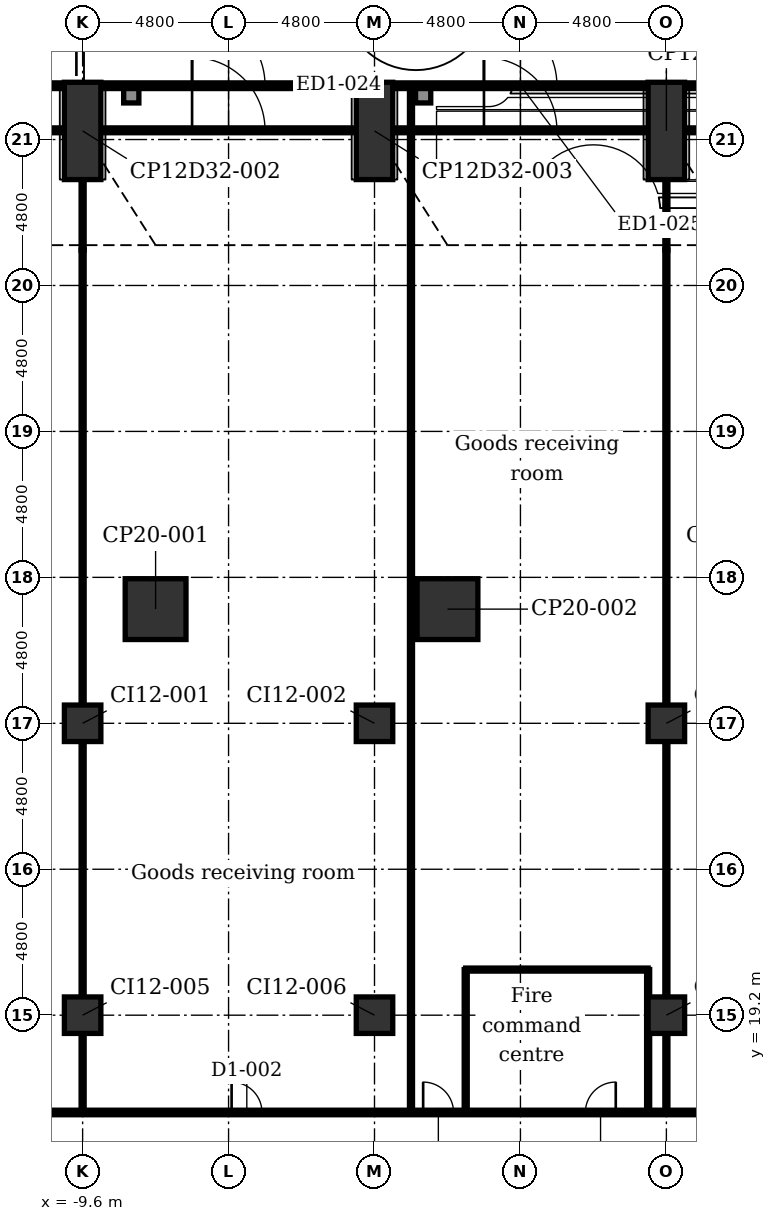
"""IFC4 building model, lengths in metres.
Left out: names, types, materials, properties, quantities, classifications, styles, units other than length and angle.
Written with IfcOpenShell. Run it as: python <this file> out.ifc"""

import sys

from ifc_helpers import new_model, si_unit, direction, frame, frame_2d, origin, origin_2d, place, context, subcontext, project, spatial, rectangle, extrude, element, fill, save


model = new_model("IFC4")
c1 = context("Model", 3, precision=1e-05, world=origin(), true_north=direction((0.0, 1.0)))
c2 = subcontext(c1, "Body", "Model", "MODEL_VIEW")
j1 = project(units=[si_unit("LENGTHUNIT", "METRE"), si_unit("PLANEANGLEUNIT", "RADIAN")], contexts=[c1])
p1 = place(None, origin())
s1 = spatial("IfcSite", under=j1, at=p1, CompositionType="ELEMENT")
p2 = place(p1, origin())
s2 = spatial("IfcBuilding", under=s1, at=p2, CompositionType="ELEMENT")
p3 = place(p2, origin())
s3 = spatial("IfcBuildingStorey", under=s2, at=p3, CompositionType="ELEMENT", Elevation=0.0)
for number, where, z_axis, x_axis in (
    (1, (-9.6, 48.283, -0.4), (0.0, 0.0, 1.0), (1.0, 0.0, 0.0)),
    (2, (0.0, 48.283, -0.4), (0.0, 0.0, 1.0), (1.0, 0.0, 0.0)),
    (3, (9.6, 48.283, -0.4), (0.0, 0.0, 1.0), (1.0, 0.0, 0.0)),
):
    element("IfcColumn", number, at=place(p3, frame(where, z_axis=z_axis, x_axis=x_axis)), inside=s3, PredefinedType="COLUMN", context=c2, shape_type="SweptSolid", body=[
        extrude(rectangle(XDim=1.2, YDim=3.2, at=origin_2d()), origin(), (0.0, 0.0, 1.0), 7.1),
    ])
for number, where, z_axis, x_axis in (
    (4, (-7.2, 32.555, -0.4), (0.0, 0.0, 1.0), (1.0, 0.0, 0.0)),
    (5, (2.4, 32.555, -0.4), (0.0, 0.0, 1.0), (1.0, 0.0, 0.0)),
):
    element("IfcColumn", number, at=place(p3, frame(where, z_axis=z_axis, x_axis=x_axis)), inside=s3, PredefinedType="COLUMN", context=c2, shape_type="SweptSolid", body=[
        extrude(rectangle(XDim=2.0, YDim=2.0, at=origin_2d()), origin(), (0.0, 0.0, 1.0), 7.1),
    ])
for number, where, z_axis, x_axis in (
    (6, (-9.6, 19.2, -0.4), (0.0, 0.0, 1.0), (1.0, 0.0, 0.0)),
    (7, (-9.6, 28.8, -0.4), (0.0, 0.0, 1.0), (1.0, 0.0, 0.0)),
    (8, (0.0, 19.2, -0.4), (0.0, 0.0, 1.0), (1.0, 0.0, 0.0)),
    (9, (0.0, 28.8, -0.4), (0.0, 0.0, 1.0), (1.0, 0.0, 0.0)),
    (10, (9.6, 19.2, -0.4), (0.0, 0.0, 1.0), (1.0, 0.0, 0.0)),
    (11, (9.6, 28.8, -0.4), (0.0, 0.0, 1.0), (1.0, 0.0, 0.0)),
):
    element("IfcColumn", number, at=place(p3, frame(where, z_axis=z_axis, x_axis=x_axis)), inside=s3, PredefinedType="COLUMN", context=c2, shape_type="SweptSolid", body=[
        extrude(rectangle(XDim=1.2, YDim=1.2, at=origin_2d()), origin(), (0.0, 0.0, 1.0), 7.1),
    ])
p4 = place(p3, frame((-18.598, 48.303, 0.0), z_axis=(0.0, 0.0, 1.0), x_axis=(1.0, 0.0, 0.0)))
e12 = element("IfcWall", 12, at=p4, inside=s3, PredefinedType="PARTITIONING", context=c2, shape_type="SweptSolid", body=[
    extrude(rectangle(XDim=8.396, YDim=0.16, at=frame_2d((4.198, 0.0))), origin(), (0.0, 0.0, 1.0), 6.7),
])
p5 = place(p4, frame((2.998, 0.0, 0.0)))
e13 = element("IfcOpeningElement", 13, at=p5, cuts=e12, PredefinedType="OPENING", context=c2, shape_type="SweptSolid", body=[
    extrude(rectangle(XDim=2.4, YDim=2.4, at=frame_2d((1.2, 1.2))), frame((0.0, 0.09, 0.0), z_axis=(0.0, -1.0, 0.0), x_axis=(1.0, 0.0, 0.0)), (0.0, 0.0, 1.0), 0.18),
])
p6 = place(p3, frame((-8.998, 48.303, 0.0), z_axis=(0.0, 0.0, 1.0), x_axis=(1.0, 0.0, 0.0)))
e14 = element("IfcWall", 14, at=p6, inside=s3, PredefinedType="PARTITIONING", context=c2, shape_type="SweptSolid", body=[
    extrude(rectangle(XDim=8.396, YDim=0.16, at=frame_2d((4.198, 0.0))), origin(), (0.0, 0.0, 1.0), 6.7),
])
p7 = place(p6, frame((2.998, 0.0, 0.0)))
e15 = element("IfcOpeningElement", 15, at=p7, cuts=e14, PredefinedType="OPENING", context=c2, shape_type="SweptSolid", body=[
    extrude(rectangle(XDim=2.4, YDim=2.4, at=frame_2d((1.2, 1.2))), frame((0.0, 0.09, 0.0), z_axis=(0.0, -1.0, 0.0), x_axis=(1.0, 0.0, 0.0)), (0.0, 0.0, 1.0), 0.18),
])
p8 = place(p3, frame((0.602, 48.303, 0.0), z_axis=(0.0, 0.0, 1.0), x_axis=(1.0, 0.0, 0.0)))
e16 = element("IfcWall", 16, at=p8, inside=s3, PredefinedType="PARTITIONING", context=c2, shape_type="SweptSolid", body=[
    extrude(rectangle(XDim=8.396, YDim=0.16, at=frame_2d((4.198, 0.0))), origin(), (0.0, 0.0, 1.0), 6.7),
])
p9 = place(p8, frame((2.998, 0.0, 0.0)))
e17 = element("IfcOpeningElement", 17, at=p9, cuts=e16, PredefinedType="OPENING", context=c2, shape_type="SweptSolid", body=[
    extrude(rectangle(XDim=2.4, YDim=2.4, at=frame_2d((1.2, 1.2))), frame((0.0, 0.09, 0.0), z_axis=(0.0, -1.0, 0.0), x_axis=(1.0, 0.0, 0.0)), (0.0, 0.0, 1.0), 0.18),
])
p10 = place(p3, frame((10.202, 48.303, 0.0), z_axis=(0.0, 0.0, 1.0), x_axis=(1.0, 0.0, 0.0)))
e18 = element("IfcWall", 18, at=p10, inside=s3, PredefinedType="PARTITIONING", context=c2, shape_type="SweptSolid", body=[
    extrude(rectangle(XDim=8.396, YDim=0.16, at=frame_2d((4.198, 0.0))), origin(), (0.0, 0.0, 1.0), 6.7),
])
p11 = place(p10, frame((2.998, 0.0, 0.0)))
e19 = element("IfcOpeningElement", 19, at=p11, cuts=e18, PredefinedType="OPENING", context=c2, shape_type="SweptSolid", body=[
    extrude(rectangle(XDim=2.4, YDim=2.4, at=frame_2d((1.2, 1.2))), frame((0.0, 0.09, 0.0), z_axis=(0.0, -1.0, 0.0), x_axis=(1.0, 0.0, 0.0)), (0.0, 0.0, 1.0), 0.18),
])
p12 = place(p3, frame((-18.596, 49.783, 0.0), z_axis=(0.0, 0.0, 1.0), x_axis=(1.0, 0.0, 0.0)))
e20 = element("IfcWall", 20, at=p12, inside=s3, PredefinedType="PARTITIONING", context=c2, shape_type="SweptSolid", body=[
    extrude(rectangle(XDim=8.392, YDim=0.16, at=frame_2d((4.196, 0.0))), origin(), (0.0, 0.0, 1.0), 6.7),
])
p13 = place(p12, frame((2.996, 0.0, 0.0)))
e21 = element("IfcOpeningElement", 21, at=p13, cuts=e20, PredefinedType="OPENING", context=c2, shape_type="SweptSolid", body=[
    extrude(rectangle(XDim=2.4, YDim=2.4, at=frame_2d((1.2, 1.2))), frame((0.0, 0.09, 0.0), z_axis=(0.0, -1.0, 0.0), x_axis=(1.0, 0.0, 0.0)), (0.0, 0.0, 1.0), 0.18),
])
p14 = place(p3, frame((-8.996, 49.783, 0.0), z_axis=(0.0, 0.0, 1.0), x_axis=(1.0, 0.0, 0.0)))
e22 = element("IfcWall", 22, at=p14, inside=s3, PredefinedType="PARTITIONING", context=c2, shape_type="SweptSolid", body=[
    extrude(rectangle(XDim=8.392, YDim=0.16, at=frame_2d((4.196, 0.0))), origin(), (0.0, 0.0, 1.0), 6.7),
])
p15 = place(p14, frame((2.996, 0.0, 0.0)))
e23 = element("IfcOpeningElement", 23, at=p15, cuts=e22, PredefinedType="OPENING", context=c2, shape_type="SweptSolid", body=[
    extrude(rectangle(XDim=2.4, YDim=2.4, at=frame_2d((1.2, 1.2))), frame((0.0, 0.09, 0.0), z_axis=(0.0, -1.0, 0.0), x_axis=(1.0, 0.0, 0.0)), (0.0, 0.0, 1.0), 0.18),
])
p16 = place(p3, frame((0.604, 49.783, 0.0), z_axis=(0.0, 0.0, 1.0), x_axis=(1.0, 0.0, 0.0)))
e24 = element("IfcWall", 24, at=p16, inside=s3, PredefinedType="PARTITIONING", context=c2, shape_type="SweptSolid", body=[
    extrude(rectangle(XDim=8.392, YDim=0.16, at=frame_2d((4.196, 0.0))), origin(), (0.0, 0.0, 1.0), 6.7),
])
p17 = place(p16, frame((2.996, 0.0, 0.0)))
e25 = element("IfcOpeningElement", 25, at=p17, cuts=e24, PredefinedType="OPENING", context=c2, shape_type="SweptSolid", body=[
    extrude(rectangle(XDim=2.4, YDim=2.4, at=frame_2d((1.2, 1.2))), frame((0.0, 0.09, 0.0), z_axis=(0.0, -1.0, 0.0), x_axis=(1.0, 0.0, 0.0)), (0.0, 0.0, 1.0), 0.18),
])
p18 = place(p3, frame((10.204, 49.783, 0.0), z_axis=(0.0, 0.0, 1.0), x_axis=(1.0, 0.0, 0.0)))
e26 = element("IfcWall", 26, at=p18, inside=s3, PredefinedType="PARTITIONING", context=c2, shape_type="SweptSolid", body=[
    extrude(rectangle(XDim=8.392, YDim=0.16, at=frame_2d((4.196, 0.0))), origin(), (0.0, 0.0, 1.0), 6.7),
])
p19 = place(p18, frame((2.996, 0.0, 0.0)))
e27 = element("IfcOpeningElement", 27, at=p19, cuts=e26, PredefinedType="OPENING", context=c2, shape_type="SweptSolid", body=[
    extrude(rectangle(XDim=2.4, YDim=2.4, at=frame_2d((1.2, 1.2))), frame((0.0, 0.09, 0.0), z_axis=(0.0, -1.0, 0.0), x_axis=(1.0, 0.0, 0.0)), (0.0, 0.0, 1.0), 0.18),
])
for number, where, z_axis, x_axis in (
    (28, (-8.25, 49.453, 0.0), (0.0, 0.0, 1.0), (1.0, 0.0, 0.0)),
    (29, (1.35, 49.453, 0.0), (0.0, 0.0, 1.0), (1.0, 0.0, 0.0)),
):
    element("IfcWall", number, at=place(p3, frame(where, z_axis=z_axis, x_axis=x_axis)), inside=s3, PredefinedType="SOLIDWALL", context=c2, shape_type="SweptSolid", body=[
        extrude(rectangle(XDim=0.5, YDim=0.5, at=frame_2d((0.25, 0.0))), origin(), (0.0, 0.0, 1.0), 6.4),
    ])
p20 = place(p3, frame((9.6, 29.36, 0.0), z_axis=(0.0, 0.0, 1.0), x_axis=(0.0, 1.0, 0.0)))
e30 = element("IfcWall", 30, at=p20, inside=s3, PredefinedType="PARTITIONING", context=c2, shape_type="SweptSolid", body=[
    extrude(rectangle(XDim=15.006, YDim=0.1, at=frame_2d((7.503, 0.0))), origin(), (0.0, 0.0, 1.0), 6.016),
])
p21 = place(p3, frame((9.6, 16.0, 0.0), z_axis=(0.0, 0.0, 1.0), x_axis=(0.0, 1.0, 0.0)))
e31 = element("IfcWall", 31, at=p21, inside=s3, PredefinedType="PARTITIONING", context=c2, shape_type="SweptSolid", body=[
    extrude(rectangle(XDim=2.64, YDim=0.1, at=frame_2d((1.32, 0.0))), origin(), (0.0, 0.0, 1.0), 6.293),
])
p22 = place(p3, frame((9.6, 18.64, 0.0), z_axis=(0.0, 0.0, 1.0), x_axis=(0.0, 1.0, 0.0)))
e32 = element("IfcWall", 32, at=p22, inside=s3, PredefinedType="PARTITIONING", context=c2, shape_type="SweptSolid", body=[
    extrude(rectangle(XDim=1.12, YDim=0.1, at=frame_2d((0.56, 0.0))), origin(), (0.0, 0.0, 1.0), 6.7),
])
p23 = place(p3, frame((9.6, 19.76, 0.0), z_axis=(0.0, 0.0, 1.0), x_axis=(0.0, 1.0, 0.0)))
e33 = element("IfcWall", 33, at=p23, inside=s3, PredefinedType="PARTITIONING", context=c2, shape_type="SweptSolid", body=[
    extrude(rectangle(XDim=8.48, YDim=0.1, at=frame_2d((4.24, 0.0))), origin(), (0.0, 0.0, 1.0), 6.293),
])
p24 = place(p3, frame((9.6, 28.24, 0.0), z_axis=(0.0, 0.0, 1.0), x_axis=(0.0, 1.0, 0.0)))
e34 = element("IfcWall", 34, at=p24, inside=s3, PredefinedType="PARTITIONING", context=c2, shape_type="SweptSolid", body=[
    extrude(rectangle(XDim=1.12, YDim=0.1, at=frame_2d((0.56, 0.0))), origin(), (0.0, 0.0, 1.0), 6.7),
])
p25 = place(p3, frame((9.6, 44.366, 0.0), z_axis=(0.0, 0.0, 1.0), x_axis=(0.0, 1.0, 0.0)))
e35 = element("IfcWall", 35, at=p25, inside=s3, PredefinedType="PARTITIONING", context=c2, shape_type="SweptSolid", body=[
    extrude(rectangle(XDim=5.347, YDim=0.1, at=frame_2d((2.673, 0.0))), origin(), (0.0, 0.0, 1.0), 6.7),
])
for number, where, z_axis, x_axis in (
    (36, (9.0, 16.0, 0.0), (0.0, 0.0, 1.0), (0.0, 1.0, 0.0)),
    (37, (3.0, 16.0, 0.0), (0.0, 0.0, 1.0), (0.0, 1.0, 0.0)),
):
    element("IfcWall", number, at=place(p3, frame(where, z_axis=z_axis, x_axis=x_axis)), inside=s3, PredefinedType="PARTITIONING", context=c2, shape_type="SweptSolid", body=[
        extrude(rectangle(XDim=4.7, YDim=0.1, at=frame_2d((2.35, 0.0))), origin(), (0.0, 0.0, 1.0), 6.7),
    ])
p26 = place(p3, frame((1.2, 16.0, 0.0), z_axis=(0.0, 0.0, 1.0), x_axis=(0.0, 1.0, 0.0)))
e38 = element("IfcWall", 38, at=p26, inside=s3, PredefinedType="PARTITIONING", context=c2, shape_type="SweptSolid", body=[
    extrude(rectangle(XDim=33.713, YDim=0.1, at=frame_2d((16.856, 0.0))), origin(), (0.0, 0.0, 1.0), 6.7),
])
p27 = place(p3, frame((-9.6, 29.36, 0.0), z_axis=(0.0, 0.0, 1.0), x_axis=(0.0, 1.0, 0.0)))
e39 = element("IfcWall", 39, at=p27, inside=s3, PredefinedType="PARTITIONING", context=c2, shape_type="SweptSolid", body=[
    extrude(rectangle(XDim=15.006, YDim=0.1, at=frame_2d((7.503, 0.0))), origin(), (0.0, 0.0, 1.0), 6.016),
])
p28 = place(p3, frame((-9.6, 16.0, 0.0), z_axis=(0.0, 0.0, 1.0), x_axis=(0.0, 1.0, 0.0)))
e40 = element("IfcWall", 40, at=p28, inside=s3, PredefinedType="PARTITIONING", context=c2, shape_type="SweptSolid", body=[
    extrude(rectangle(XDim=2.64, YDim=0.1, at=frame_2d((1.32, 0.0))), origin(), (0.0, 0.0, 1.0), 6.293),
])
p29 = place(p3, frame((-9.6, 18.64, 0.0), z_axis=(0.0, 0.0, 1.0), x_axis=(0.0, 1.0, 0.0)))
e41 = element("IfcWall", 41, at=p29, inside=s3, PredefinedType="PARTITIONING", context=c2, shape_type="SweptSolid", body=[
    extrude(rectangle(XDim=1.12, YDim=0.1, at=frame_2d((0.56, 0.0))), origin(), (0.0, 0.0, 1.0), 6.7),
])
p30 = place(p3, frame((-9.6, 19.76, 0.0), z_axis=(0.0, 0.0, 1.0), x_axis=(0.0, 1.0, 0.0)))
e42 = element("IfcWall", 42, at=p30, inside=s3, PredefinedType="PARTITIONING", context=c2, shape_type="SweptSolid", body=[
    extrude(rectangle(XDim=8.48, YDim=0.1, at=frame_2d((4.24, 0.0))), origin(), (0.0, 0.0, 1.0), 6.293),
])
p31 = place(p3, frame((-9.6, 28.24, 0.0), z_axis=(0.0, 0.0, 1.0), x_axis=(0.0, 1.0, 0.0)))
e43 = element("IfcWall", 43, at=p31, inside=s3, PredefinedType="PARTITIONING", context=c2, shape_type="SweptSolid", body=[
    extrude(rectangle(XDim=1.12, YDim=0.1, at=frame_2d((0.56, 0.0))), origin(), (0.0, 0.0, 1.0), 6.7),
])
p32 = place(p3, frame((-9.6, 44.366, 0.0), z_axis=(0.0, 0.0, 1.0), x_axis=(0.0, 1.0, 0.0)))
e44 = element("IfcWall", 44, at=p32, inside=s3, PredefinedType="PARTITIONING", context=c2, shape_type="SweptSolid", body=[
    extrude(rectangle(XDim=5.347, YDim=0.1, at=frame_2d((2.673, 0.0))), origin(), (0.0, 0.0, 1.0), 6.7),
])
p33 = place(p3, frame((-16.8, 16.0, 0.0), z_axis=(0.0, 0.0, 1.0), x_axis=(1.0, 0.0, 0.0)))
e45 = element("IfcWall", 45, at=p33, inside=s3, PredefinedType="PARTITIONING", context=c2, shape_type="SweptSolid", body=[
    extrude(rectangle(XDim=33.6, YDim=0.15, at=frame_2d((16.8, 0.0))), origin(), (0.0, 0.0, 1.0), 6.7),
])
p34 = place(p33, frame((3.1, 0.0, 0.0)))
e46 = element("IfcOpeningElement", 46, at=p34, cuts=e45, PredefinedType="OPENING", context=c2, shape_type="SweptSolid", body=[
    extrude(rectangle(XDim=1.0, YDim=2.1, at=frame_2d((0.5, 1.05))), frame((0.0, 0.085, 0.0), z_axis=(0.0, -1.0, 0.0), x_axis=(1.0, 0.0, 0.0)), (0.0, 0.0, 1.0), 0.17),
])
p35 = place(p33, frame((12.1, 0.0, 0.0)))
e47 = element("IfcOpeningElement", 47, at=p35, cuts=e45, PredefinedType="OPENING", context=c2, shape_type="SweptSolid", body=[
    extrude(rectangle(XDim=1.0, YDim=2.1, at=frame_2d((0.5, 1.05))), frame((0.0, 0.085, 0.0), z_axis=(0.0, -1.0, 0.0), x_axis=(1.0, 0.0, 0.0)), (0.0, 0.0, 1.0), 0.17),
])
p36 = place(p33, frame((29.5, 0.0, 0.0)))
e48 = element("IfcOpeningElement", 48, at=p36, cuts=e45, PredefinedType="OPENING", context=c2, shape_type="SweptSolid", body=[
    extrude(rectangle(XDim=1.0, YDim=2.1, at=frame_2d((0.5, 1.05))), frame((0.0, 0.085, 0.0), z_axis=(0.0, -1.0, 0.0), x_axis=(1.0, 0.0, 0.0)), (0.0, 0.0, 1.0), 0.17),
])
p37 = place(p33, frame((23.735, 0.0, 0.0)))
e49 = element("IfcOpeningElement", 49, at=p37, cuts=e45, PredefinedType="OPENING", context=c2, shape_type="SweptSolid", body=[
    extrude(rectangle(XDim=1.0, YDim=2.1, at=frame_2d((0.5, 1.05))), frame((0.0, 0.085, 0.0), z_axis=(0.0, -1.0, 0.0), x_axis=(1.0, 0.0, 0.0)), (0.0, 0.0, 1.0), 0.17),
])
p38 = place(p33, frame((18.4, 0.0, 0.0)))
e50 = element("IfcOpeningElement", 50, at=p38, cuts=e45, PredefinedType="OPENING", context=c2, shape_type="SweptSolid", body=[
    extrude(rectangle(XDim=1.0, YDim=2.1, at=frame_2d((0.5, 1.05))), frame((0.0, 0.085, 0.0), z_axis=(0.0, -1.0, 0.0), x_axis=(1.0, 0.0, 0.0)), (0.0, 0.0, 1.0), 0.17),
])
p39 = place(p3, frame((3.0, 20.7, 0.0), z_axis=(0.0, 0.0, 1.0), x_axis=(1.0, 0.0, 0.0)))
e51 = element("IfcWall", 51, at=p39, inside=s3, PredefinedType="PARTITIONING", context=c2, shape_type="SweptSolid", body=[
    extrude(rectangle(XDim=6.0, YDim=0.1, at=frame_2d((3.0, 0.0))), origin(), (0.0, 0.0, 1.0), 6.7),
])
p40 = place(p7, origin())
e52 = element("IfcDoor", 52, at=p40, inside=s3, OperationType="DOUBLE_DOOR_DOUBLE_SWING", PredefinedType="DOOR", context=c2, shape_type="SweptSolid", body=[
    extrude(rectangle(XDim=2.4, YDim=2.4, at=frame_2d((1.2, 1.2))), frame((0.0, 0.025, 0.0), z_axis=(0.0, -1.0, 0.0), x_axis=(1.0, 0.0, 0.0)), (0.0, 0.0, 1.0), 0.05),
])
fill(e15, e52)
p41 = place(p9, origin())
e53 = element("IfcDoor", 53, at=p41, inside=s3, OperationType="DOUBLE_DOOR_DOUBLE_SWING", PredefinedType="DOOR", context=c2, shape_type="SweptSolid", body=[
    extrude(rectangle(XDim=2.4, YDim=2.4, at=frame_2d((1.2, 1.2))), frame((0.0, 0.025, 0.0), z_axis=(0.0, -1.0, 0.0), x_axis=(1.0, 0.0, 0.0)), (0.0, 0.0, 1.0), 0.05),
])
fill(e17, e53)
p42 = place(p15, origin())
e54 = element("IfcDoor", 54, at=p42, inside=s3, OperationType="DOUBLE_DOOR_DOUBLE_SWING", PredefinedType="DOOR", context=c2, shape_type="SweptSolid", body=[
    extrude(rectangle(XDim=2.4, YDim=2.4, at=frame_2d((1.2, 1.2))), frame((0.0, 0.025, 0.0), z_axis=(0.0, -1.0, 0.0), x_axis=(1.0, 0.0, 0.0)), (0.0, 0.0, 1.0), 0.05),
])
fill(e23, e54)
p43 = place(p17, origin())
e55 = element("IfcDoor", 55, at=p43, inside=s3, OperationType="DOUBLE_DOOR_DOUBLE_SWING", PredefinedType="DOOR", context=c2, shape_type="SweptSolid", body=[
    extrude(rectangle(XDim=2.4, YDim=2.4, at=frame_2d((1.2, 1.2))), frame((0.0, 0.025, 0.0), z_axis=(0.0, -1.0, 0.0), x_axis=(1.0, 0.0, 0.0)), (0.0, 0.0, 1.0), 0.05),
])
fill(e25, e55)
p44 = place(p35, origin())
e56 = element("IfcDoor", 56, at=p44, inside=s3, OperationType="SINGLE_SWING_LEFT", PredefinedType="DOOR", context=c2, shape_type="SweptSolid", body=[
    extrude(rectangle(XDim=1.0, YDim=2.1, at=frame_2d((0.5, 1.05))), frame((0.0, 0.025, 0.0), z_axis=(0.0, -1.0, 0.0), x_axis=(1.0, 0.0, 0.0)), (0.0, 0.0, 1.0), 0.05),
])
fill(e47, e56)
p45 = place(p37, origin())
e57 = element("IfcDoor", 57, at=p45, inside=s3, OperationType="SINGLE_SWING_RIGHT", PredefinedType="DOOR", context=c2, shape_type="SweptSolid", body=[
    extrude(rectangle(XDim=1.0, YDim=2.1, at=frame_2d((0.5, 1.05))), frame((0.0, 0.025, 0.0), z_axis=(0.0, -1.0, 0.0), x_axis=(1.0, 0.0, 0.0)), (0.0, 0.0, 1.0), 0.05),
])
fill(e49, e57)
p46 = place(p38, origin())
e58 = element("IfcDoor", 58, at=p46, inside=s3, OperationType="SINGLE_SWING_LEFT", PredefinedType="DOOR", context=c2, shape_type="SweptSolid", body=[
    extrude(rectangle(XDim=1.0, YDim=2.1, at=frame_2d((0.5, 1.05))), frame((0.0, 0.025, 0.0), z_axis=(0.0, -1.0, 0.0), x_axis=(1.0, 0.0, 0.0)), (0.0, 0.0, 1.0), 0.05),
])
fill(e50, e58)
save(model, sys.argv[1])
